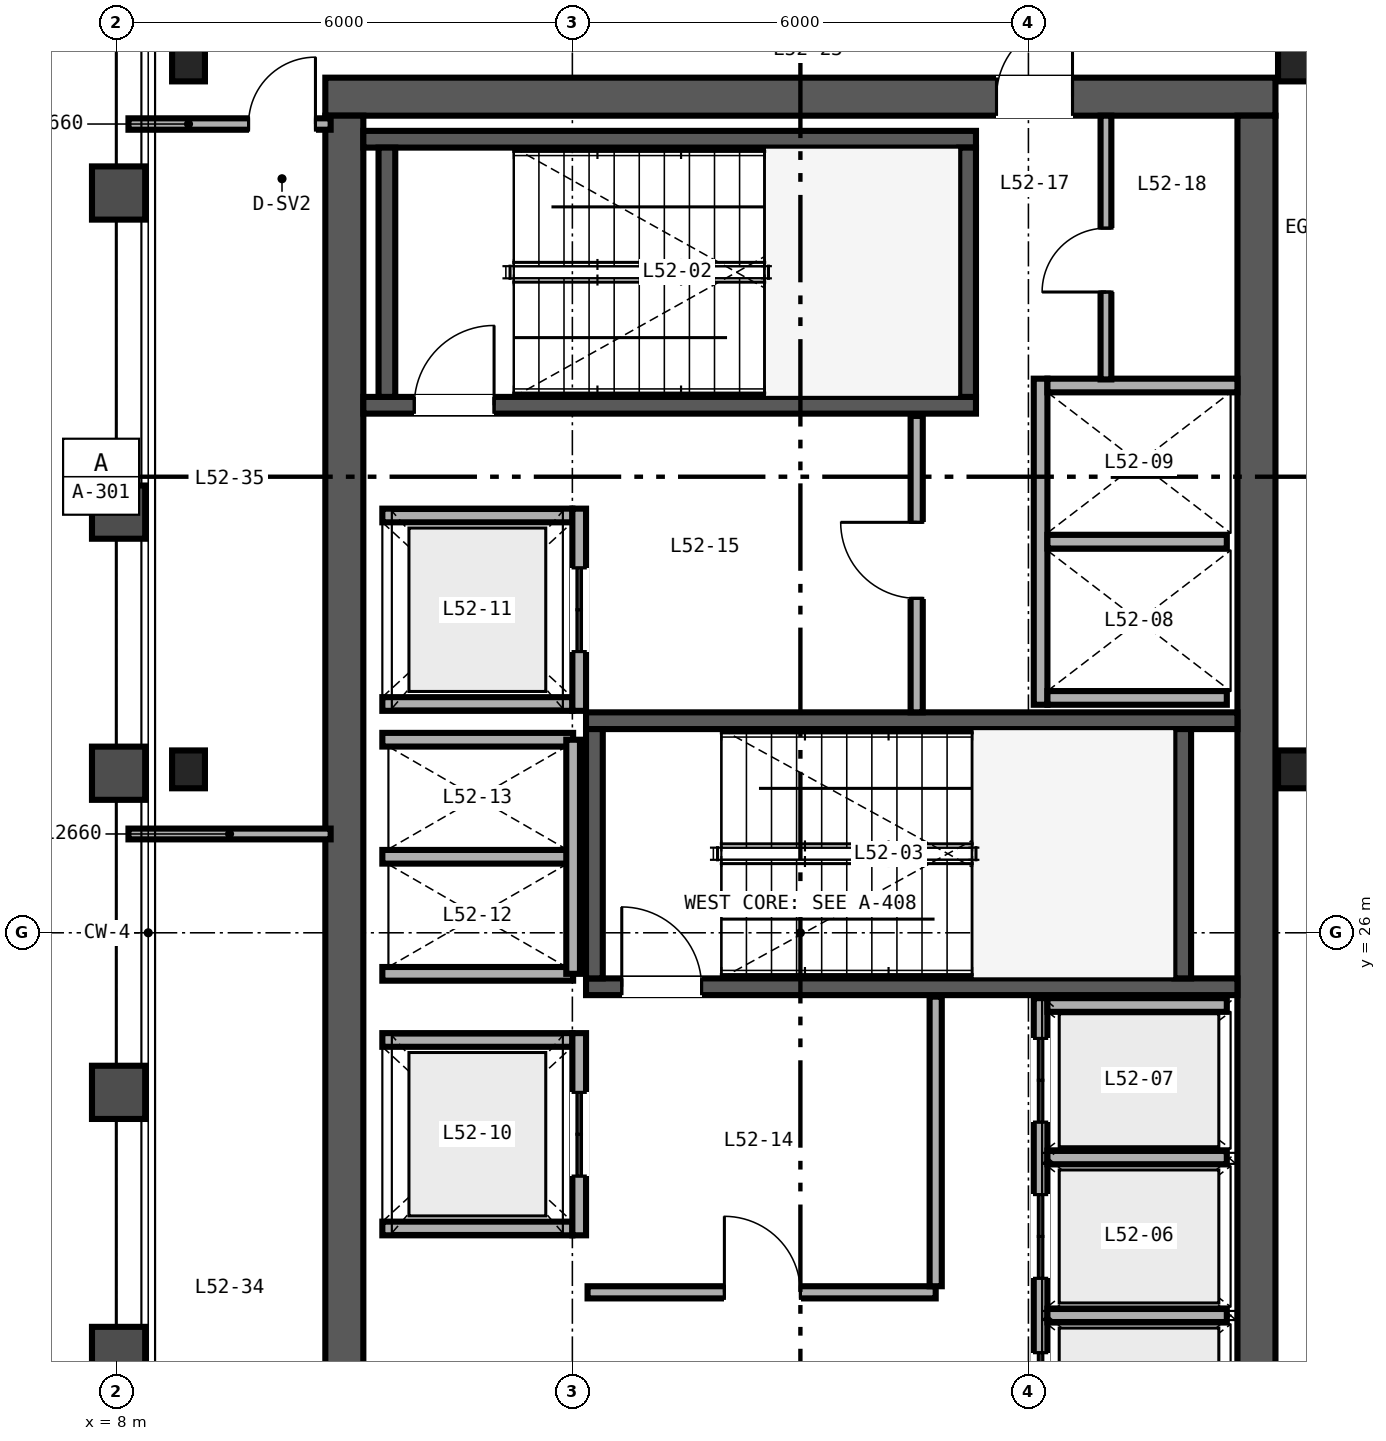
"""IFC4 building model, lengths in metres.
Left out: names, types, materials, properties, quantities, classifications, styles, units other than length and angle.
Written with IfcOpenShell. Run it as: python <this file> out.ifc"""

import sys

from ifc_helpers import new_model, si_unit, direction, frame, frame_2d, origin, origin_2d, place, context, subcontext, project, spatial, rectangle, i_section, extrude, source, transform, mapped, element, fill, save


model = new_model("IFC4")
c1 = context("Model", 3, precision=1e-05, world=origin(), true_north=direction((0.0, 1.0)))
c2 = subcontext(c1, "Body", "Model", "MODEL_VIEW")
j1 = project(units=[si_unit("LENGTHUNIT", "METRE"), si_unit("PLANEANGLEUNIT", "RADIAN")], contexts=[c1])
p1 = place(None, origin())
s1 = spatial("IfcSite", under=j1, at=p1, CompositionType="ELEMENT")
p2 = place(p1, origin())
s2 = spatial("IfcBuilding", under=s1, at=p2, CompositionType="ELEMENT")
p3 = place(p2, frame((0.0, 0.0, 206.4)))
s3 = spatial("IfcBuildingStorey", under=s2, at=p3, CompositionType="ELEMENT", Elevation=206.4)
p4 = place(p3, frame((10.75, 37.0, 0.0), z_axis=(0.0, 0.0, 1.0), x_axis=(1.0, 0.0, 0.0)))
e1 = element("IfcWall", 1, at=p4, inside=s3, PredefinedType="SHEAR", context=c2, shape_type="SweptSolid", body=[
    extrude(rectangle(XDim=12.5, YDim=0.5, at=frame_2d((6.25, 0.0))), origin(), (0.0, 0.0, 1.0), 3.37),
])
p5 = place(p4, frame((8.83, 0.0, 0.0)))
e2 = element("IfcOpeningElement", 2, at=p5, cuts=e1, PredefinedType="OPENING", context=c2, shape_type="SweptSolid", body=[
    extrude(rectangle(XDim=1.0, YDim=2.15, at=frame_2d((0.5, 1.075))), frame((0.0, 0.26, 0.0), z_axis=(0.0, -1.0, 0.0), x_axis=(1.0, 0.0, 0.0)), (0.0, 0.0, 1.0), 0.52),
])
for number, where, z_axis, x_axis in (
    (3, (11.0, 15.25, 0.0), (0.0, 0.0, 1.0), (0.0, 1.0, 0.0)),
    (4, (23.0, 15.25, 0.0), (0.0, 0.0, 1.0), (0.0, 1.0, 0.0)),
):
    element("IfcWall", number, at=place(p3, frame(where, z_axis=z_axis, x_axis=x_axis)), inside=s3, PredefinedType="SHEAR", context=c2, shape_type="SweptSolid", body=[
        extrude(rectangle(XDim=21.5, YDim=0.5, at=frame_2d((10.75, 0.0))), origin(), (0.0, 0.0, 1.0), 3.37),
    ])
p6 = place(p3, frame((11.25, 32.94, 0.0), z_axis=(0.0, 0.0, 1.0), x_axis=(1.0, 0.0, 0.0)))
e5 = element("IfcWall", 5, at=p6, inside=s3, PredefinedType="SHEAR", context=c2, shape_type="SweptSolid", body=[
    extrude(rectangle(XDim=8.06, YDim=0.22, at=frame_2d((4.03, 0.0))), origin(), (0.0, 0.0, 1.0), 3.4),
])
p7 = place(p6, frame((0.67, 0.0, 0.0)))
e6 = element("IfcOpeningElement", 6, at=p7, cuts=e5, PredefinedType="OPENING", context=c2, shape_type="SweptSolid", body=[
    extrude(rectangle(XDim=1.05, YDim=2.15, at=frame_2d((0.525, 1.075))), frame((0.0, 0.12, 0.0), z_axis=(0.0, -1.0, 0.0), x_axis=(1.0, 0.0, 0.0)), (0.0, 0.0, 1.0), 0.24),
])
p8 = place(p3, frame((11.25, 36.44, 0.0), z_axis=(0.0, 0.0, 1.0), x_axis=(1.0, 0.0, 0.0)))
e7 = element("IfcWall", 7, at=p8, inside=s3, PredefinedType="SHEAR", context=c2, shape_type="SweptSolid", body=[
    extrude(rectangle(XDim=8.06, YDim=0.22, at=frame_2d((4.03, 0.0))), origin(), (0.0, 0.0, 1.0), 3.4),
])
for number, where, z_axis, x_axis in (
    (8, (11.56, 33.05, 0.0), (0.0, 0.0, 1.0), (0.0, 1.0, 0.0)),
    (9, (19.2, 33.05, 0.0), (0.0, 0.0, 1.0), (0.0, 1.0, 0.0)),
):
    element("IfcWall", number, at=place(p3, frame(where, z_axis=z_axis, x_axis=x_axis)), inside=s3, PredefinedType="SHEAR", context=c2, shape_type="SweptSolid", body=[
        extrude(rectangle(XDim=3.28, YDim=0.22, at=frame_2d((1.64, 0.0))), origin(), (0.0, 0.0, 1.0), 3.4),
    ])
p9 = place(p3, frame((14.18, 25.29, 0.0), z_axis=(0.0, 0.0, 1.0), x_axis=(1.0, 0.0, 0.0)))
e10 = element("IfcWall", 10, at=p9, inside=s3, PredefinedType="SHEAR", context=c2, shape_type="SweptSolid", body=[
    extrude(rectangle(XDim=8.57, YDim=0.22, at=frame_2d((4.285, 0.0))), origin(), (0.0, 0.0, 1.0), 3.4),
])
p10 = place(p9, frame((0.47, 0.0, 0.0)))
e11 = element("IfcOpeningElement", 11, at=p10, cuts=e10, PredefinedType="OPENING", context=c2, shape_type="SweptSolid", body=[
    extrude(rectangle(XDim=1.05, YDim=2.15, at=frame_2d((0.525, 1.075))), frame((0.0, 0.12, 0.0), z_axis=(0.0, -1.0, 0.0), x_axis=(1.0, 0.0, 0.0)), (0.0, 0.0, 1.0), 0.24),
])
p11 = place(p3, frame((14.18, 28.79, 0.0), z_axis=(0.0, 0.0, 1.0), x_axis=(1.0, 0.0, 0.0)))
e12 = element("IfcWall", 12, at=p11, inside=s3, PredefinedType="SHEAR", context=c2, shape_type="SweptSolid", body=[
    extrude(rectangle(XDim=8.57, YDim=0.22, at=frame_2d((4.285, 0.0))), origin(), (0.0, 0.0, 1.0), 3.4),
])
for number, where, z_axis, x_axis in (
    (13, (14.29, 25.4, 0.0), (0.0, 0.0, 1.0), (0.0, 1.0, 0.0)),
    (14, (22.03, 25.4, 0.0), (0.0, 0.0, 1.0), (0.0, 1.0, 0.0)),
):
    element("IfcWall", number, at=place(p3, frame(where, z_axis=z_axis, x_axis=x_axis)), inside=s3, PredefinedType="SHEAR", context=c2, shape_type="SweptSolid", body=[
        extrude(rectangle(XDim=3.28, YDim=0.22, at=frame_2d((1.64, 0.0))), origin(), (0.0, 0.0, 1.0), 3.4),
    ])
m1 = source(origin(), c2, "Body", "SweptSolid", [
    extrude(i_section(OverallWidth=0.432, OverallDepth=0.498, WebThickness=0.056, FlangeThickness=0.089, FilletRadius=0.025, at=origin_2d()), origin(), (0.0, 0.0, 1.0), 3.37),
])
for number, where, z_axis, x_axis in (
    (15, (8.95, 28.15, 0.0), (0.0, 0.0, 1.0), (1.0, 0.0, 0.0)),
    (16, (23.5, 28.15, 0.0), (0.0, 0.0, 1.0), (1.0, 0.0, 0.0)),
    (17, (8.95, 37.45, 0.0), (0.0, 0.0, 1.0), (1.0, 0.0, 0.0)),
    (18, (23.5, 37.45, 0.0), (0.0, 0.0, 1.0), (1.0, 0.0, 0.0)),
):
    element("IfcColumn", number, at=place(p3, frame(where, z_axis=z_axis, x_axis=x_axis)), inside=s3, PredefinedType="COLUMN", context=c2, shape_type="MappedRepresentation", body=[
        mapped(m1, transform((0.0, 0.0, 0.0), scale=1.0)),
    ])
p12 = place(p3, frame((20.16, 18.82, 0.0), z_axis=(0.0, 0.0, 1.0), x_axis=(0.0, 1.0, 0.0)))
e19 = element("IfcWall", 19, at=p12, inside=s3, PredefinedType="SOLIDWALL", context=c2, shape_type="SweptSolid", body=[
    extrude(rectangle(XDim=6.32, YDim=0.18, at=frame_2d((3.16, 0.0))), origin(), (0.0, 0.0, 1.0), 2.47),
])
p13 = place(p12, frame((0.555, 0.0, 0.0)))
e20 = element("IfcOpeningElement", 20, at=p13, cuts=e19, PredefinedType="OPENING", context=c2, shape_type="SweptSolid", body=[
    extrude(rectangle(XDim=1.1, YDim=2.2, at=frame_2d((0.55, 1.1))), frame((0.0, 0.1, 0.0), z_axis=(0.0, -1.0, 0.0), x_axis=(1.0, 0.0, 0.0)), (0.0, 0.0, 1.0), 0.2),
])
p14 = place(p12, frame((2.635, 0.0, 0.0)))
e21 = element("IfcOpeningElement", 21, at=p14, cuts=e19, PredefinedType="OPENING", context=c2, shape_type="SweptSolid", body=[
    extrude(rectangle(XDim=1.1, YDim=2.2, at=frame_2d((0.55, 1.1))), frame((0.0, 0.1, 0.0), z_axis=(0.0, -1.0, 0.0), x_axis=(1.0, 0.0, 0.0)), (0.0, 0.0, 1.0), 0.2),
])
p15 = place(p12, frame((4.69, 0.0, 0.0)))
e22 = element("IfcOpeningElement", 22, at=p15, cuts=e19, PredefinedType="OPENING", context=c2, shape_type="SweptSolid", body=[
    extrude(rectangle(XDim=1.1, YDim=2.2, at=frame_2d((0.55, 1.1))), frame((0.0, 0.1, 0.0), z_axis=(0.0, -1.0, 0.0), x_axis=(1.0, 0.0, 0.0)), (0.0, 0.0, 1.0), 0.2),
])
p16 = place(p3, frame((20.25, 25.05, 0.0), z_axis=(0.0, 0.0, 1.0), x_axis=(1.0, 0.0, 0.0)))
e23 = element("IfcWall", 23, at=p16, inside=s3, PredefinedType="SOLIDWALL", context=c2, shape_type="SweptSolid", body=[
    extrude(rectangle(XDim=2.36, YDim=0.18, at=frame_2d((1.18, 0.0))), origin(), (0.0, 0.0, 1.0), 3.37),
])
p17 = place(p3, frame((20.25, 20.965, 0.0), z_axis=(0.0, 0.0, 1.0), x_axis=(1.0, 0.0, 0.0)))
e24 = element("IfcWall", 24, at=p17, inside=s3, PredefinedType="SOLIDWALL", context=c2, shape_type="SweptSolid", body=[
    extrude(rectangle(XDim=2.36, YDim=0.18, at=frame_2d((1.18, 0.0))), origin(), (0.0, 0.0, 1.0), 2.47),
])
p18 = place(p3, frame((20.25, 23.045, 0.0), z_axis=(0.0, 0.0, 1.0), x_axis=(1.0, 0.0, 0.0)))
e25 = element("IfcWall", 25, at=p18, inside=s3, PredefinedType="SOLIDWALL", context=c2, shape_type="SweptSolid", body=[
    extrude(rectangle(XDim=2.36, YDim=0.18, at=frame_2d((1.18, 0.0))), origin(), (0.0, 0.0, 1.0), 3.37),
])
p19 = place(p3, frame((20.16, 29.0, 0.0), z_axis=(0.0, 0.0, 1.0), x_axis=(0.0, 1.0, 0.0)))
e26 = element("IfcWall", 26, at=p19, inside=s3, PredefinedType="SOLIDWALL", context=c2, shape_type="SweptSolid", body=[
    extrude(rectangle(XDim=4.29, YDim=0.18, at=frame_2d((2.145, 0.0))), origin(), (0.0, 0.0, 1.0), 3.37),
])
p20 = place(p3, frame((20.25, 29.09, 0.0), z_axis=(0.0, 0.0, 1.0), x_axis=(1.0, 0.0, 0.0)))
e27 = element("IfcWall", 27, at=p20, inside=s3, PredefinedType="SOLIDWALL", context=c2, shape_type="SweptSolid", body=[
    extrude(rectangle(XDim=2.36, YDim=0.18, at=frame_2d((1.18, 0.0))), origin(), (0.0, 0.0, 1.0), 3.37),
])
p21 = place(p3, frame((20.25, 33.2, 0.0), z_axis=(0.0, 0.0, 1.0), x_axis=(1.0, 0.0, 0.0)))
e28 = element("IfcWall", 28, at=p21, inside=s3, PredefinedType="SOLIDWALL", context=c2, shape_type="SweptSolid", body=[
    extrude(rectangle(XDim=2.5, YDim=0.18, at=frame_2d((1.25, 0.0))), origin(), (0.0, 0.0, 1.0), 3.37),
])
p22 = place(p3, frame((20.25, 31.145, 0.0), z_axis=(0.0, 0.0, 1.0), x_axis=(1.0, 0.0, 0.0)))
e29 = element("IfcWall", 29, at=p22, inside=s3, PredefinedType="SOLIDWALL", context=c2, shape_type="SweptSolid", body=[
    extrude(rectangle(XDim=2.36, YDim=0.18, at=frame_2d((1.18, 0.0))), origin(), (0.0, 0.0, 1.0), 3.37),
])
for number, where, z_axis, x_axis in (
    (30, (11.5, 22.11, 0.0), (0.0, 0.0, 1.0), (1.0, 0.0, 0.0)),
    (31, (11.5, 24.59, 0.0), (0.0, 0.0, 1.0), (1.0, 0.0, 0.0)),
):
    element("IfcWall", number, at=place(p3, frame(where, z_axis=z_axis, x_axis=x_axis)), inside=s3, PredefinedType="SOLIDWALL", context=c2, shape_type="SweptSolid", body=[
        extrude(rectangle(XDim=2.5, YDim=0.18, at=frame_2d((1.25, 0.0))), origin(), (0.0, 0.0, 1.0), 3.37),
    ])
p23 = place(p3, frame((14.09, 22.02, 0.0), z_axis=(0.0, 0.0, 1.0), x_axis=(0.0, 1.0, 0.0)))
e32 = element("IfcWall", 32, at=p23, inside=s3, PredefinedType="SOLIDWALL", context=c2, shape_type="SweptSolid", body=[
    extrude(rectangle(XDim=2.66, YDim=0.18, at=frame_2d((1.33, 0.0))), origin(), (0.0, 0.0, 1.0), 3.37),
])
p24 = place(p23, frame((0.78, 0.0, 0.0)))
e33 = element("IfcOpeningElement", 33, at=p24, cuts=e32, PredefinedType="OPENING", context=c2, shape_type="SweptSolid", body=[
    extrude(rectangle(XDim=1.1, YDim=2.2, at=frame_2d((0.55, 1.1))), frame((0.0, 0.1, 0.0), z_axis=(0.0, -1.0, 0.0), x_axis=(1.0, 0.0, 0.0)), (0.0, 0.0, 1.0), 0.2),
])
for number, where, z_axis, x_axis in (
    (34, (11.5, 29.01, 0.0), (0.0, 0.0, 1.0), (1.0, 0.0, 0.0)),
    (35, (11.5, 31.49, 0.0), (0.0, 0.0, 1.0), (1.0, 0.0, 0.0)),
):
    element("IfcWall", number, at=place(p3, frame(where, z_axis=z_axis, x_axis=x_axis)), inside=s3, PredefinedType="SOLIDWALL", context=c2, shape_type="SweptSolid", body=[
        extrude(rectangle(XDim=2.5, YDim=0.18, at=frame_2d((1.25, 0.0))), origin(), (0.0, 0.0, 1.0), 3.37),
    ])
p25 = place(p3, frame((14.09, 28.92, 0.0), z_axis=(0.0, 0.0, 1.0), x_axis=(0.0, 1.0, 0.0)))
e36 = element("IfcWall", 36, at=p25, inside=s3, PredefinedType="SOLIDWALL", context=c2, shape_type="SweptSolid", body=[
    extrude(rectangle(XDim=2.66, YDim=0.18, at=frame_2d((1.33, 0.0))), origin(), (0.0, 0.0, 1.0), 3.37),
])
p26 = place(p25, frame((0.78, 0.0, 0.0)))
e37 = element("IfcOpeningElement", 37, at=p26, cuts=e36, PredefinedType="OPENING", context=c2, shape_type="SweptSolid", body=[
    extrude(rectangle(XDim=1.1, YDim=2.2, at=frame_2d((0.55, 1.1))), frame((0.0, 0.1, 0.0), z_axis=(0.0, -1.0, 0.0), x_axis=(1.0, 0.0, 0.0)), (0.0, 0.0, 1.0), 0.2),
])
for number, where, z_axis, x_axis in (
    (38, (11.5, 25.46, 0.0), (0.0, 0.0, 1.0), (1.0, 0.0, 0.0)),
    (39, (11.5, 27.0, 0.0), (0.0, 0.0, 1.0), (1.0, 0.0, 0.0)),
    (40, (11.5, 28.54, 0.0), (0.0, 0.0, 1.0), (1.0, 0.0, 0.0)),
):
    element("IfcWall", number, at=place(p3, frame(where, z_axis=z_axis, x_axis=x_axis)), inside=s3, PredefinedType="SOLIDWALL", context=c2, shape_type="SweptSolid", body=[
        extrude(rectangle(XDim=2.51, YDim=0.18, at=frame_2d((1.255, 0.0))), origin(), (0.0, 0.0, 1.0), 3.37),
    ])
p27 = place(p3, frame((14.01, 25.46, 0.0), z_axis=(0.0, 0.0, 1.0), x_axis=(0.0, 1.0, 0.0)))
e41 = element("IfcWall", 41, at=p27, inside=s3, PredefinedType="SOLIDWALL", context=c2, shape_type="SweptSolid", body=[
    extrude(rectangle(XDim=3.08, YDim=0.18, at=frame_2d((1.54, 0.0))), origin(), (0.0, 0.0, 1.0), 3.37),
])
p28 = place(p3, frame((14.2, 21.27, 0.0), z_axis=(0.0, 0.0, 1.0), x_axis=(1.0, 0.0, 0.0)))
e42 = element("IfcWall", 42, at=p28, inside=s3, PredefinedType="PARTITIONING", context=c2, shape_type="SweptSolid", body=[
    extrude(rectangle(XDim=4.58, YDim=0.16, at=frame_2d((2.29, 0.0))), origin(), (0.0, 0.0, 1.0), 3.37),
])
p29 = place(p28, frame((1.8, 0.0, 0.0)))
e43 = element("IfcOpeningElement", 43, at=p29, cuts=e42, PredefinedType="OPENING", context=c2, shape_type="SweptSolid", body=[
    extrude(rectangle(XDim=1.0, YDim=2.15, at=frame_2d((0.5, 1.075))), frame((0.0, 0.09, 0.0), z_axis=(0.0, -1.0, 0.0), x_axis=(1.0, 0.0, 0.0)), (0.0, 0.0, 1.0), 0.18),
])
p30 = place(p3, frame((18.78, 21.35, 0.0), z_axis=(0.0, 0.0, 1.0), x_axis=(0.0, 1.0, 0.0)))
e44 = element("IfcWall", 44, at=p30, inside=s3, PredefinedType="PARTITIONING", context=c2, shape_type="SweptSolid", body=[
    extrude(rectangle(XDim=3.81, YDim=0.16, at=frame_2d((1.905, 0.0))), origin(), (0.0, 0.0, 1.0), 3.37),
])
p31 = place(p3, frame((18.53, 28.9, 0.0), z_axis=(0.0, 0.0, 1.0), x_axis=(0.0, 1.0, 0.0)))
e45 = element("IfcWall", 45, at=p31, inside=s3, PredefinedType="PARTITIONING", context=c2, shape_type="SweptSolid", body=[
    extrude(rectangle(XDim=3.9, YDim=0.16, at=frame_2d((1.95, 0.0))), origin(), (0.0, 0.0, 1.0), 3.37),
])
p32 = place(p31, frame((1.5, 0.0, 0.0)))
e46 = element("IfcOpeningElement", 46, at=p32, cuts=e45, PredefinedType="OPENING", context=c2, shape_type="SweptSolid", body=[
    extrude(rectangle(XDim=1.0, YDim=2.15, at=frame_2d((0.5, 1.075))), frame((0.0, 0.09, 0.0), z_axis=(0.0, -1.0, 0.0), x_axis=(1.0, 0.0, 0.0)), (0.0, 0.0, 1.0), 0.18),
])
p33 = place(p3, frame((21.02, 33.28, 0.0), z_axis=(0.0, 0.0, 1.0), x_axis=(0.0, 1.0, 0.0)))
e47 = element("IfcWall", 47, at=p33, inside=s3, PredefinedType="PARTITIONING", context=c2, shape_type="SweptSolid", body=[
    extrude(rectangle(XDim=3.47, YDim=0.142, at=frame_2d((1.735, 0.0))), origin(), (0.0, 0.0, 1.0), 3.37),
])
p34 = place(p33, frame((1.15, 0.0, 0.0)))
e48 = element("IfcOpeningElement", 48, at=p34, cuts=e47, PredefinedType="OPENING", context=c2, shape_type="SweptSolid", body=[
    extrude(rectangle(XDim=0.84, YDim=2.1, at=frame_2d((0.42, 1.05))), frame((0.0, 0.081, 0.0), z_axis=(0.0, -1.0, 0.0), x_axis=(1.0, 0.0, 0.0)), (0.0, 0.0, 1.0), 0.162),
])
p35 = place(p3, frame((8.16, 36.64, 0.0), z_axis=(0.0, 0.0, 1.0), x_axis=(1.0, 0.0, 0.0)))
e49 = element("IfcWall", 49, at=p35, inside=s3, PredefinedType="PARTITIONING", context=c2, shape_type="SweptSolid", body=[
    extrude(rectangle(XDim=2.66, YDim=0.15, at=frame_2d((1.33, 0.0))), origin(), (0.0, 0.0, 1.0), 2.753),
])
p36 = place(p35, frame((1.58, 0.0, 0.0)))
e50 = element("IfcOpeningElement", 50, at=p36, cuts=e49, PredefinedType="OPENING", context=c2, shape_type="SweptSolid", body=[
    extrude(rectangle(XDim=0.88, YDim=2.15, at=frame_2d((0.44, 1.075))), frame((0.0, 0.085, 0.0), z_axis=(0.0, -1.0, 0.0), x_axis=(1.0, 0.0, 0.0)), (0.0, 0.0, 1.0), 0.17),
])
p37 = place(p3, frame((8.16, 27.3, 0.0), z_axis=(0.0, 0.0, 1.0), x_axis=(1.0, 0.0, 0.0)))
e51 = element("IfcWall", 51, at=p37, inside=s3, PredefinedType="PARTITIONING", context=c2, shape_type="SweptSolid", body=[
    extrude(rectangle(XDim=2.66, YDim=0.142, at=frame_2d((1.33, 0.0))), origin(), (0.0, 0.0, 1.0), 2.591),
])
m2 = source(origin(), c2, "Body", "SweptSolid", [
    extrude(rectangle(XDim=1.05, YDim=2.15, at=frame_2d((0.525, 1.075))), frame((0.0, 0.025, 0.0), z_axis=(0.0, -1.0, 0.0), x_axis=(1.0, 0.0, 0.0)), (0.0, 0.0, 1.0), 0.05),
])
p38 = place(p7, origin())
e52 = element("IfcDoor", 52, at=p38, inside=s3, OperationType="SINGLE_SWING_RIGHT", PredefinedType="DOOR", context=c2, shape_type="MappedRepresentation", body=[
    mapped(m2, transform((0.0, 0.0, 0.0), scale=1.0)),
])
fill(e6, e52)
p39 = place(p10, origin())
e53 = element("IfcDoor", 53, at=p39, inside=s3, OperationType="SINGLE_SWING_LEFT", PredefinedType="DOOR", context=c2, shape_type="MappedRepresentation", body=[
    mapped(m2, transform((0.0, 0.0, 0.0), scale=1.0)),
])
fill(e11, e53)
m3 = source(origin(), c2, "Body", "SweptSolid", [
    extrude(rectangle(XDim=1.1, YDim=2.2, at=frame_2d((0.55, 1.1))), frame((0.0, 0.025, 0.0), z_axis=(0.0, -1.0, 0.0), x_axis=(1.0, 0.0, 0.0)), (0.0, 0.0, 1.0), 0.05),
])
p40 = place(p13, origin())
e54 = element("IfcDoor", 54, at=p40, inside=s3, OperationType="DOUBLE_DOOR_SLIDING", PredefinedType="DOOR", context=c2, shape_type="MappedRepresentation", body=[
    mapped(m3, transform((0.0, 0.0, 0.0), scale=1.0)),
])
fill(e20, e54)
p41 = place(p14, origin())
e55 = element("IfcDoor", 55, at=p41, inside=s3, OperationType="DOUBLE_DOOR_SLIDING", PredefinedType="DOOR", context=c2, shape_type="MappedRepresentation", body=[
    mapped(m3, transform((0.0, 0.0, 0.0), scale=1.0)),
])
fill(e21, e55)
p42 = place(p15, origin())
e56 = element("IfcDoor", 56, at=p42, inside=s3, OperationType="DOUBLE_DOOR_SLIDING", PredefinedType="DOOR", context=c2, shape_type="MappedRepresentation", body=[
    mapped(m3, transform((0.0, 0.0, 0.0), scale=1.0)),
])
fill(e22, e56)
p43 = place(p24, origin())
e57 = element("IfcDoor", 57, at=p43, inside=s3, OperationType="DOUBLE_DOOR_SLIDING", PredefinedType="DOOR", context=c2, shape_type="MappedRepresentation", body=[
    mapped(m3, transform((0.0, 0.0, 0.0), scale=1.0)),
])
fill(e33, e57)
p44 = place(p26, origin())
e58 = element("IfcDoor", 58, at=p44, inside=s3, OperationType="DOUBLE_DOOR_SLIDING", PredefinedType="DOOR", context=c2, shape_type="MappedRepresentation", body=[
    mapped(m3, transform((0.0, 0.0, 0.0), scale=1.0)),
])
fill(e37, e58)
m4 = source(origin(), c2, "Body", "SweptSolid", [
    extrude(rectangle(XDim=1.0, YDim=2.15, at=frame_2d((0.5, 1.075))), frame((0.0, 0.025, 0.0), z_axis=(0.0, -1.0, 0.0), x_axis=(1.0, 0.0, 0.0)), (0.0, 0.0, 1.0), 0.05),
])
p45 = place(p29, origin())
e59 = element("IfcDoor", 59, at=p45, inside=s3, OperationType="SINGLE_SWING_LEFT", PredefinedType="DOOR", context=c2, shape_type="MappedRepresentation", body=[
    mapped(m4, transform((0.0, 0.0, 0.0), scale=1.0)),
])
fill(e43, e59)
p46 = place(p32, origin())
e60 = element("IfcDoor", 60, at=p46, inside=s3, OperationType="SINGLE_SWING_RIGHT", PredefinedType="DOOR", context=c2, shape_type="MappedRepresentation", body=[
    mapped(m4, transform((0.0, 0.0, 0.0), scale=1.0)),
])
fill(e46, e60)
m5 = source(origin(), c2, "Body", "SweptSolid", [
    extrude(rectangle(XDim=0.84, YDim=2.1, at=frame_2d((0.42, 1.05))), frame((0.0, 0.025, 0.0), z_axis=(0.0, -1.0, 0.0), x_axis=(1.0, 0.0, 0.0)), (0.0, 0.0, 1.0), 0.05),
])
p47 = place(p34, origin())
e61 = element("IfcDoor", 61, at=p47, inside=s3, OperationType="SINGLE_SWING_LEFT", PredefinedType="DOOR", context=c2, shape_type="MappedRepresentation", body=[
    mapped(m5, transform((0.0, 0.0, 0.0), scale=1.0)),
])
fill(e48, e61)
p48 = place(p5, origin())
e62 = element("IfcDoor", 62, at=p48, inside=s3, OperationType="SINGLE_SWING_RIGHT", PredefinedType="DOOR", context=c2, shape_type="MappedRepresentation", body=[
    mapped(m4, transform((0.0, 0.0, 0.0), scale=1.0)),
])
fill(e2, e62)
m6 = source(origin(), c2, "Body", "SweptSolid", [
    extrude(rectangle(XDim=0.88, YDim=2.15, at=frame_2d((0.44, 1.075))), frame((0.0, 0.025, 0.0), z_axis=(0.0, -1.0, 0.0), x_axis=(1.0, 0.0, 0.0)), (0.0, 0.0, 1.0), 0.05),
])
p49 = place(p36, origin())
e63 = element("IfcDoor", 63, at=p49, inside=s3, OperationType="SINGLE_SWING_RIGHT", PredefinedType="DOOR", context=c2, shape_type="MappedRepresentation", body=[
    mapped(m6, transform((0.0, 0.0, 0.0), scale=1.0)),
])
fill(e50, e63)
save(model, sys.argv[1])
